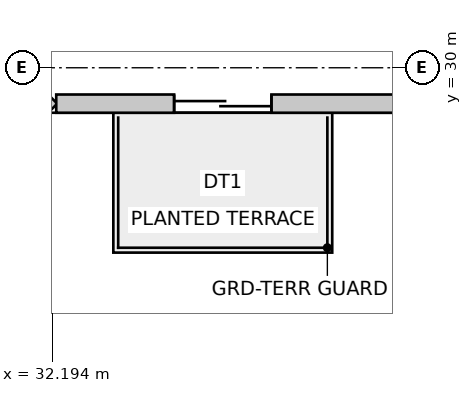
"""IFC4 building model, lengths in metres.
Left out: names, types, materials, properties, quantities, classifications, styles, units other than length and angle.
Written with IfcOpenShell. Run it as: python <this file> out.ifc"""

import sys

from ifc_helpers import new_model, si_unit, direction, frame, frame_2d, origin, place, context, subcontext, project, spatial, rectangle, extrude, source, transform, mapped, element, fill, save


model = new_model("IFC4")
c1 = context("Model", 3, precision=1e-05, world=origin(), true_north=direction((0.0, 1.0)))
c2 = subcontext(c1, "Body", "Model", "MODEL_VIEW")
j1 = project(units=[si_unit("LENGTHUNIT", "METRE"), si_unit("PLANEANGLEUNIT", "RADIAN")], contexts=[c1])
p1 = place(None, origin())
s1 = spatial("IfcSite", under=j1, at=p1, CompositionType="ELEMENT")
p2 = place(p1, origin())
s2 = spatial("IfcBuilding", under=s1, at=p2, CompositionType="ELEMENT")
p3 = place(p2, frame((0.0, 0.0, 47.0)))
s3 = spatial("IfcBuildingStorey", under=s2, at=p3, CompositionType="ELEMENT", Elevation=47.0)
p4 = place(p3, frame((30.116, 27.46, 0.0), z_axis=(0.0, 0.0, 1.0), x_axis=(0.707106781187, 0.707106781187, 0.0)))
e1 = element("IfcWall", 1, at=p4, inside=s3, PredefinedType="SOLIDWALL", context=c2, shape_type="SweptSolid", body=[
    extrude(rectangle(XDim=2.907, YDim=0.3, at=frame_2d((1.454, 0.0))), origin(), (0.0, 0.0, 1.0), 3.75),
])
m1 = source(origin(), c2, "Body", "SweptSolid", [
    extrude(rectangle(XDim=2.1, YDim=2.0, at=frame_2d((1.05, 1.0))), frame((0.0, 0.16, 0.0), z_axis=(0.0, -1.0, 0.0), x_axis=(1.0, 0.0, 0.0)), (0.0, 0.0, 1.0), 0.32),
])
p5 = place(p4, frame((0.404, 0.0, 0.85)))
e2 = element("IfcOpeningElement", 2, at=p5, cuts=e1, PredefinedType="OPENING", context=c2, shape_type="MappedRepresentation", body=[
    mapped(m1, transform((0.0, 0.0, 0.0), scale=1.0)),
])
p6 = place(p3, frame((32.261, 29.41, 0.0), z_axis=(0.0, 0.0, 1.0), x_axis=(1.0, 0.0, 0.0)))
e3 = element("IfcWall", 3, at=p6, inside=s3, PredefinedType="SOLIDWALL", context=c2, shape_type="SweptSolid", body=[
    extrude(rectangle(XDim=25.627, YDim=0.3, at=frame_2d((12.813, 0.0))), origin(), (0.0, 0.0, 1.0), 3.75),
])
m2 = source(origin(), c2, "Body", "SweptSolid", [
    extrude(rectangle(XDim=1.6, YDim=2.15, at=frame_2d((0.8, 1.075))), frame((0.0, 0.16, 0.0), z_axis=(0.0, -1.0, 0.0), x_axis=(1.0, 0.0, 0.0)), (0.0, 0.0, 1.0), 0.32),
])
p7 = place(p6, frame((1.939, 0.0, 0.0)))
e4 = element("IfcOpeningElement", 4, at=p7, cuts=e3, PredefinedType="OPENING", context=c2, shape_type="MappedRepresentation", body=[
    mapped(m2, transform((0.0, 0.0, 0.0), scale=1.0)),
])
m3 = source(origin(), c2, "Body", "SweptSolid", [
    extrude(rectangle(XDim=2.4, YDim=2.2, at=frame_2d((1.2, 1.1))), frame((0.0, 0.16, 0.0), z_axis=(0.0, -1.0, 0.0), x_axis=(1.0, 0.0, 0.0)), (0.0, 0.0, 1.0), 0.32),
])
p8 = place(p6, frame((6.2, 0.0, 0.85)))
e5 = element("IfcOpeningElement", 5, at=p8, cuts=e3, PredefinedType="OPENING", context=c2, shape_type="MappedRepresentation", body=[
    mapped(m3, transform((0.0, 0.0, 0.0), scale=1.0)),
])
m4 = source(origin(), c2, "Body", "SweptSolid", [
    extrude(rectangle(XDim=2.8, YDim=2.4, at=frame_2d((1.4, 1.2))), frame((0.0, 0.16, 0.0), z_axis=(0.0, -1.0, 0.0), x_axis=(1.0, 0.0, 0.0)), (0.0, 0.0, 1.0), 0.32),
])
p9 = place(p6, frame((13.163, 0.0, 0.85)))
e6 = element("IfcOpeningElement", 6, at=p9, cuts=e3, PredefinedType="OPENING", context=c2, shape_type="MappedRepresentation", body=[
    mapped(m4, transform((0.0, 0.0, 0.0), scale=1.0)),
])
p10 = place(p6, frame((20.526, 0.0, 0.85)))
e7 = element("IfcOpeningElement", 7, at=p10, cuts=e3, PredefinedType="OPENING", context=c2, shape_type="MappedRepresentation", body=[
    mapped(m3, transform((0.0, 0.0, 0.0), scale=1.0)),
])
m5 = source(origin(), c2, "Body", "SweptSolid", [
    extrude(rectangle(XDim=1.6, YDim=2.15, at=frame_2d((0.8, 1.075))), frame((0.0, 0.025, 0.0), z_axis=(0.0, -1.0, 0.0), x_axis=(1.0, 0.0, 0.0)), (0.0, 0.0, 1.0), 0.05),
])
p11 = place(p7, origin())
e8 = element("IfcDoor", 8, at=p11, inside=s3, OperationType="DOUBLE_DOOR_SLIDING", PredefinedType="DOOR", context=c2, shape_type="MappedRepresentation", body=[
    mapped(m5, transform((0.0, 0.0, 0.0), scale=1.0)),
])
fill(e4, e8)
save(model, sys.argv[1])
